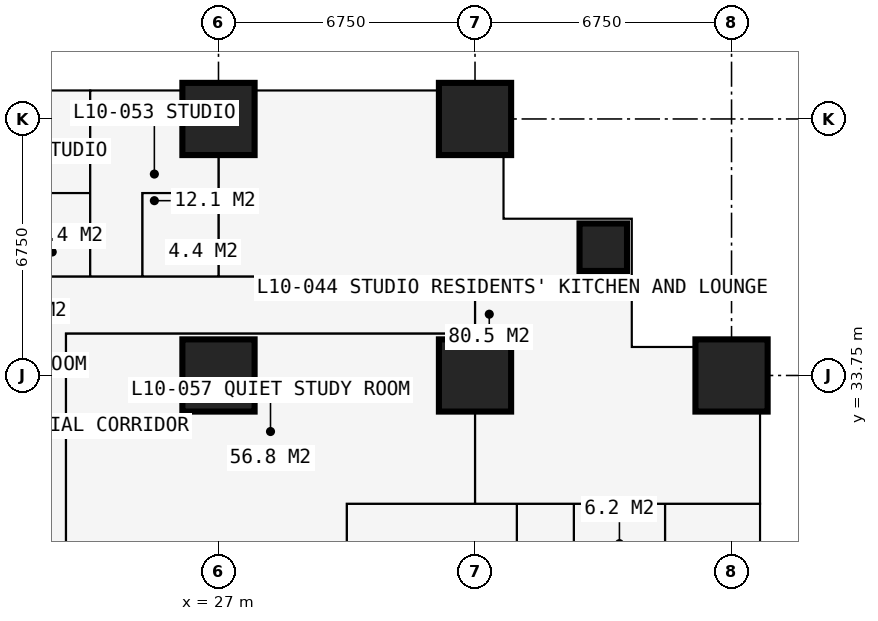
"""IFC4 building model, lengths in metres.
Left out: names, types, materials, properties, quantities, classifications, styles, units other than length and angle.
Written with IfcOpenShell. Run it as: python <this file> out.ifc"""

import sys

from ifc_helpers import new_model, si_unit, direction, frame, frame_2d, origin, origin_2d, place, context, subcontext, project, spatial, rectangle, extrude, element, fill, save


model = new_model("IFC4")
c1 = context("Model", 3, precision=1e-05, world=origin(), true_north=direction((0.0, 1.0)))
c2 = subcontext(c1, "Body", "Model", "MODEL_VIEW")
j1 = project(units=[si_unit("LENGTHUNIT", "METRE"), si_unit("PLANEANGLEUNIT", "RADIAN")], contexts=[c1])
p1 = place(None, origin())
s1 = spatial("IfcSite", under=j1, at=p1, CompositionType="ELEMENT")
p2 = place(p1, origin())
s2 = spatial("IfcBuilding", under=s1, at=p2, CompositionType="ELEMENT")
p3 = place(p2, frame((0.0, 0.0, 39.6)))
s3 = spatial("IfcBuildingStorey", under=s2, at=p3, CompositionType="ELEMENT", Elevation=39.6)
for number, where, z_axis, x_axis in (
    (1, (27.0, 33.75, 0.0), (0.0, 0.0, 1.0), (1.0, 0.0, 0.0)),
    (2, (27.0, 40.5, 0.0), (0.0, 0.0, 1.0), (1.0, 0.0, 0.0)),
    (3, (33.75, 33.75, 0.0), (0.0, 0.0, 1.0), (1.0, 0.0, 0.0)),
    (4, (33.75, 40.5, 0.0), (0.0, 0.0, 1.0), (1.0, 0.0, 0.0)),
):
    element("IfcColumn", number, at=place(p3, frame(where, z_axis=z_axis, x_axis=x_axis)), inside=s3, PredefinedType="COLUMN", context=c2, shape_type="SweptSolid", body=[
        extrude(rectangle(XDim=1.9, YDim=1.9, at=origin_2d()), origin(), (0.0, 0.0, 1.0), 3.6),
    ])
p4 = place(p3, frame((37.125, 37.125, 0.0), z_axis=(0.0, 0.0, 1.0), x_axis=(1.0, 0.0, 0.0)))
e5 = element("IfcColumn", 5, at=p4, inside=s3, PredefinedType="COLUMN", context=c2, shape_type="SweptSolid", body=[
    extrude(rectangle(XDim=1.25, YDim=1.25, at=origin_2d()), origin(), (0.0, 0.0, 1.0), 3.6),
])
p5 = place(p3, frame((40.5, 33.75, 0.0), z_axis=(0.0, 0.0, 1.0), x_axis=(1.0, 0.0, 0.0)))
e6 = element("IfcColumn", 6, at=p5, inside=s3, PredefinedType="COLUMN", context=c2, shape_type="SweptSolid", body=[
    extrude(rectangle(XDim=1.9, YDim=1.9, at=origin_2d()), origin(), (0.0, 0.0, 1.0), 3.6),
])
p6 = place(p3, frame((41.25, 34.5, 0.0), z_axis=(0.0, 0.0, 1.0), x_axis=(-1.0, 0.0, 0.0)))
e7 = element("IfcWall", 7, at=p6, inside=s3, PredefinedType="SOLIDWALL", context=c2, shape_type="SweptSolid", body=[
    extrude(rectangle(XDim=3.375, YDim=0.3, at=frame_2d((1.688, 0.0))), origin(), (0.0, 0.0, 1.0), 3.375),
])
p7 = place(p6, frame((1.857, 0.0, 0.9)))
e8 = element("IfcOpeningElement", 8, at=p7, cuts=e7, PredefinedType="OPENING", context=c2, shape_type="SweptSolid", body=[
    extrude(rectangle(XDim=1.2, YDim=1.8, at=frame_2d((0.6, 0.9))), frame((0.0, 0.16, 0.0), z_axis=(0.0, -1.0, 0.0), x_axis=(1.0, 0.0, 0.0)), (0.0, 0.0, 1.0), 0.32),
])
p8 = place(p3, frame((37.875, 34.5, 0.0), z_axis=(0.0, 0.0, 1.0), x_axis=(0.0, 1.0, 0.0)))
e9 = element("IfcWall", 9, at=p8, inside=s3, PredefinedType="SOLIDWALL", context=c2, shape_type="SweptSolid", body=[
    extrude(rectangle(XDim=3.375, YDim=0.3, at=frame_2d((1.688, 0.0))), origin(), (0.0, 0.0, 1.0), 3.375),
])
p9 = place(p8, frame((0.788, 0.0, 0.6)))
e10 = element("IfcOpeningElement", 10, at=p9, cuts=e9, PredefinedType="OPENING", context=c2, shape_type="SweptSolid", body=[
    extrude(rectangle(XDim=1.8, YDim=2.1, at=frame_2d((0.9, 1.05))), frame((0.0, 0.16, 0.0), z_axis=(0.0, -1.0, 0.0), x_axis=(1.0, 0.0, 0.0)), (0.0, 0.0, 1.0), 0.32),
])
p10 = place(p3, frame((37.875, 37.875, 0.0), z_axis=(0.0, 0.0, 1.0), x_axis=(-1.0, 0.0, 0.0)))
e11 = element("IfcWall", 11, at=p10, inside=s3, PredefinedType="SOLIDWALL", context=c2, shape_type="SweptSolid", body=[
    extrude(rectangle(XDim=3.375, YDim=0.3, at=frame_2d((1.688, 0.0))), origin(), (0.0, 0.0, 1.0), 3.375),
])
p11 = place(p10, frame((0.788, 0.0, 0.6)))
e12 = element("IfcOpeningElement", 12, at=p11, cuts=e11, PredefinedType="OPENING", context=c2, shape_type="SweptSolid", body=[
    extrude(rectangle(XDim=1.8, YDim=2.1, at=frame_2d((0.9, 1.05))), frame((0.0, 0.16, 0.0), z_axis=(0.0, -1.0, 0.0), x_axis=(1.0, 0.0, 0.0)), (0.0, 0.0, 1.0), 0.32),
])
p12 = place(p3, frame((34.5, 37.875, 0.0), z_axis=(0.0, 0.0, 1.0), x_axis=(0.0, 1.0, 0.0)))
e13 = element("IfcWall", 13, at=p12, inside=s3, PredefinedType="SOLIDWALL", context=c2, shape_type="SweptSolid", body=[
    extrude(rectangle(XDim=3.375, YDim=0.3, at=frame_2d((1.688, 0.0))), origin(), (0.0, 0.0, 1.0), 3.375),
])
p13 = place(p12, frame((0.317, 0.0, 0.9)))
e14 = element("IfcOpeningElement", 14, at=p13, cuts=e13, PredefinedType="OPENING", context=c2, shape_type="SweptSolid", body=[
    extrude(rectangle(XDim=1.2, YDim=1.8, at=frame_2d((0.6, 0.9))), frame((0.0, 0.16, 0.0), z_axis=(0.0, -1.0, 0.0), x_axis=(1.0, 0.0, 0.0)), (0.0, 0.0, 1.0), 0.32),
])
p14 = place(p3, frame((10.125, 36.35, 0.0), z_axis=(0.0, 0.0, 1.0), x_axis=(1.0, 0.0, 0.0)))
e15 = element("IfcWall", 15, at=p14, inside=s3, PredefinedType="PARTITIONING", context=c2, shape_type="SweptSolid", body=[
    extrude(rectangle(XDim=23.625, YDim=0.1, at=frame_2d((11.812, 0.0))), origin(), (0.0, 0.0, 1.0), 3.375),
])
p15 = place(p14, frame((0.2, 0.0, 0.0)))
e16 = element("IfcOpeningElement", 16, at=p15, cuts=e15, PredefinedType="OPENING", context=c2, shape_type="SweptSolid", body=[
    extrude(rectangle(XDim=0.95, YDim=2.2, at=frame_2d((0.475, 1.1))), frame((0.0, 0.06, 0.0), z_axis=(0.0, -1.0, 0.0), x_axis=(1.0, 0.0, 0.0)), (0.0, 0.0, 1.0), 0.12),
])
p16 = place(p14, frame((3.625, 0.0, 0.0)))
e17 = element("IfcOpeningElement", 17, at=p16, cuts=e15, PredefinedType="OPENING", context=c2, shape_type="SweptSolid", body=[
    extrude(rectangle(XDim=0.95, YDim=2.2, at=frame_2d((0.475, 1.1))), frame((0.0, 0.06, 0.0), z_axis=(0.0, -1.0, 0.0), x_axis=(1.0, 0.0, 0.0)), (0.0, 0.0, 1.0), 0.12),
])
p17 = place(p14, frame((7.0, 0.0, 0.0)))
e18 = element("IfcOpeningElement", 18, at=p17, cuts=e15, PredefinedType="OPENING", context=c2, shape_type="SweptSolid", body=[
    extrude(rectangle(XDim=0.95, YDim=2.2, at=frame_2d((0.475, 1.1))), frame((0.0, 0.06, 0.0), z_axis=(0.0, -1.0, 0.0), x_axis=(1.0, 0.0, 0.0)), (0.0, 0.0, 1.0), 0.12),
])
p18 = place(p14, frame((10.375, 0.0, 0.0)))
e19 = element("IfcOpeningElement", 19, at=p18, cuts=e15, PredefinedType="OPENING", context=c2, shape_type="SweptSolid", body=[
    extrude(rectangle(XDim=0.95, YDim=2.2, at=frame_2d((0.475, 1.1))), frame((0.0, 0.06, 0.0), z_axis=(0.0, -1.0, 0.0), x_axis=(1.0, 0.0, 0.0)), (0.0, 0.0, 1.0), 0.12),
])
p19 = place(p14, frame((13.75, 0.0, 0.0)))
e20 = element("IfcOpeningElement", 20, at=p19, cuts=e15, PredefinedType="OPENING", context=c2, shape_type="SweptSolid", body=[
    extrude(rectangle(XDim=0.95, YDim=2.2, at=frame_2d((0.475, 1.1))), frame((0.0, 0.06, 0.0), z_axis=(0.0, -1.0, 0.0), x_axis=(1.0, 0.0, 0.0)), (0.0, 0.0, 1.0), 0.12),
])
p20 = place(p3, frame((21.625, 38.55, 0.0), z_axis=(0.0, 0.0, 1.0), x_axis=(1.0, 0.0, 0.0)))
e21 = element("IfcWall", 21, at=p20, inside=s3, PredefinedType="PARTITIONING", context=c2, shape_type="SweptSolid", body=[
    extrude(rectangle(XDim=2.0, YDim=0.1, at=frame_2d((1.0, 0.0))), origin(), (0.0, 0.0, 1.0), 3.375),
])
p21 = place(p3, frame((22.988, 34.85, 0.0), z_axis=(0.0, 0.0, 1.0), x_axis=(1.0, 0.0, 0.0)))
e22 = element("IfcWall", 22, at=p21, inside=s3, PredefinedType="PARTITIONING", context=c2, shape_type="SweptSolid", body=[
    extrude(rectangle(XDim=10.762, YDim=0.15, at=frame_2d((5.381, 0.0))), origin(), (0.0, 0.0, 1.0), 3.375),
])
p22 = place(p21, frame((5.0, 0.0, 0.0)))
e23 = element("IfcOpeningElement", 23, at=p22, cuts=e22, PredefinedType="OPENING", context=c2, shape_type="SweptSolid", body=[
    extrude(rectangle(XDim=0.95, YDim=2.2, at=frame_2d((0.475, 1.1))), frame((0.0, 0.085, 0.0), z_axis=(0.0, -1.0, 0.0), x_axis=(1.0, 0.0, 0.0)), (0.0, 0.0, 1.0), 0.17),
])
p23 = place(p3, frame((22.988, 29.2, 0.0), z_axis=(0.0, 0.0, 1.0), x_axis=(0.0, 1.0, 0.0)))
e24 = element("IfcWall", 24, at=p23, inside=s3, PredefinedType="PARTITIONING", context=c2, shape_type="SweptSolid", body=[
    extrude(rectangle(XDim=5.65, YDim=0.15, at=frame_2d((2.825, 0.0))), origin(), (0.0, 0.0, 1.0), 3.375),
])
p24 = place(p3, frame((23.625, 36.35, 0.0), z_axis=(0.0, 0.0, 1.0), x_axis=(0.0, 1.0, 0.0)))
e25 = element("IfcWall", 25, at=p24, inside=s3, PredefinedType="PARTITIONING", context=c2, shape_type="SweptSolid", body=[
    extrude(rectangle(XDim=4.884, YDim=0.175, at=frame_2d((2.442, 0.0))), origin(), (0.0, 0.0, 1.0), 3.375),
])
p25 = place(p3, frame((25.0, 36.35, 0.0), z_axis=(0.0, 0.0, 1.0), x_axis=(0.0, 1.0, 0.0)))
e26 = element("IfcWall", 26, at=p25, inside=s3, PredefinedType="PARTITIONING", context=c2, shape_type="SweptSolid", body=[
    extrude(rectangle(XDim=2.2, YDim=0.1, at=frame_2d((1.1, 0.0))), origin(), (0.0, 0.0, 1.0), 3.375),
])
p26 = place(p25, frame((0.65, 0.0, 0.0)))
e27 = element("IfcOpeningElement", 27, at=p26, cuts=e26, PredefinedType="OPENING", context=c2, shape_type="SweptSolid", body=[
    extrude(rectangle(XDim=0.9, YDim=2.2, at=frame_2d((0.45, 1.1))), frame((0.0, 0.06, 0.0), z_axis=(0.0, -1.0, 0.0), x_axis=(1.0, 0.0, 0.0)), (0.0, 0.0, 1.0), 0.12),
])
p27 = place(p3, frame((25.0, 38.55, 0.0), z_axis=(0.0, 0.0, 1.0), x_axis=(1.0, 0.0, 0.0)))
e28 = element("IfcWall", 28, at=p27, inside=s3, PredefinedType="PARTITIONING", context=c2, shape_type="SweptSolid", body=[
    extrude(rectangle(XDim=2.0, YDim=0.1, at=frame_2d((1.0, 0.0))), origin(), (0.0, 0.0, 1.0), 3.375),
])
p28 = place(p3, frame((27.0, 36.35, 0.0), z_axis=(0.0, 0.0, 1.0), x_axis=(0.0, 1.0, 0.0)))
e29 = element("IfcWall", 29, at=p28, inside=s3, PredefinedType="PARTITIONING", context=c2, shape_type="SweptSolid", body=[
    extrude(rectangle(XDim=4.884, YDim=0.15, at=frame_2d((2.442, 0.0))), origin(), (0.0, 0.0, 1.0), 2.61),
])
p29 = place(p3, frame((30.375, 29.2, 0.0), z_axis=(0.0, 0.0, 1.0), x_axis=(0.0, 1.0, 0.0)))
e30 = element("IfcWall", 30, at=p29, inside=s3, PredefinedType="PARTITIONING", context=c2, shape_type="SweptSolid", body=[
    extrude(rectangle(XDim=1.175, YDim=0.15, at=frame_2d((0.587, 0.0))), origin(), (0.0, 0.0, 1.0), 3.375),
])
p30 = place(p3, frame((30.375, 30.375, 0.0), z_axis=(0.0, 0.0, 1.0), x_axis=(1.0, 0.0, 0.0)))
e31 = element("IfcWall", 31, at=p30, inside=s3, PredefinedType="PARTITIONING", context=c2, shape_type="SweptSolid", body=[
    extrude(rectangle(XDim=10.859, YDim=0.15, at=frame_2d((5.429, 0.0))), origin(), (0.0, 0.0, 1.0), 3.375),
])
p31 = place(p30, frame((4.725, 0.0, 0.0)))
e32 = element("IfcOpeningElement", 32, at=p31, cuts=e31, PredefinedType="OPENING", context=c2, shape_type="SweptSolid", body=[
    extrude(rectangle(XDim=1.0, YDim=2.2, at=frame_2d((0.5, 1.1))), frame((0.0, 0.085, 0.0), z_axis=(0.0, -1.0, 0.0), x_axis=(1.0, 0.0, 0.0)), (0.0, 0.0, 1.0), 0.17),
])
p32 = place(p3, frame((33.75, 30.375, 0.0), z_axis=(0.0, 0.0, 1.0), x_axis=(0.0, 1.0, 0.0)))
e33 = element("IfcWall", 33, at=p32, inside=s3, PredefinedType="PARTITIONING", context=c2, shape_type="SweptSolid", body=[
    extrude(rectangle(XDim=5.975, YDim=0.15, at=frame_2d((2.988, 0.0))), origin(), (0.0, 0.0, 1.0), 2.877),
])
p33 = place(p3, frame((34.85, 12.55, 0.0), z_axis=(0.0, 0.0, 1.0), x_axis=(0.0, 1.0, 0.0)))
e34 = element("IfcWall", 34, at=p33, inside=s3, PredefinedType="PARTITIONING", context=c2, shape_type="SweptSolid", body=[
    extrude(rectangle(XDim=17.825, YDim=0.15, at=frame_2d((8.913, 0.0))), origin(), (0.0, 0.0, 1.0), 3.375),
])
p34 = place(p33, frame((8.65, 0.0, 0.0)))
e35 = element("IfcOpeningElement", 35, at=p34, cuts=e34, PredefinedType="OPENING", context=c2, shape_type="SweptSolid", body=[
    extrude(rectangle(XDim=0.95, YDim=2.2, at=frame_2d((0.475, 1.1))), frame((0.0, 0.085, 0.0), z_axis=(0.0, -1.0, 0.0), x_axis=(1.0, 0.0, 0.0)), (0.0, 0.0, 1.0), 0.17),
])
p35 = place(p3, frame((36.35, 6.75, 0.0), z_axis=(0.0, 0.0, 1.0), x_axis=(0.0, 1.0, 0.0)))
e36 = element("IfcWall", 36, at=p35, inside=s3, PredefinedType="PARTITIONING", context=c2, shape_type="SweptSolid", body=[
    extrude(rectangle(XDim=23.625, YDim=0.15, at=frame_2d((11.812, 0.0))), origin(), (0.0, 0.0, 1.0), 3.375),
])
p36 = place(p35, frame((18.475, 0.0, 0.0)))
e37 = element("IfcOpeningElement", 37, at=p36, cuts=e36, PredefinedType="OPENING", context=c2, shape_type="SweptSolid", body=[
    extrude(rectangle(XDim=0.95, YDim=2.2, at=frame_2d((0.475, 1.1))), frame((0.0, 0.085, 0.0), z_axis=(0.0, -1.0, 0.0), x_axis=(1.0, 0.0, 0.0)), (0.0, 0.0, 1.0), 0.17),
])
p37 = place(p35, frame((11.725, 0.0, 0.0)))
e38 = element("IfcOpeningElement", 38, at=p37, cuts=e36, PredefinedType="OPENING", context=c2, shape_type="SweptSolid", body=[
    extrude(rectangle(XDim=0.95, YDim=2.2, at=frame_2d((0.475, 1.1))), frame((0.0, 0.085, 0.0), z_axis=(0.0, -1.0, 0.0), x_axis=(1.0, 0.0, 0.0)), (0.0, 0.0, 1.0), 0.17),
])
p38 = place(p35, frame((6.95, 0.0, 0.0)))
e39 = element("IfcOpeningElement", 39, at=p38, cuts=e36, PredefinedType="OPENING", context=c2, shape_type="SweptSolid", body=[
    extrude(rectangle(XDim=0.95, YDim=2.2, at=frame_2d((0.475, 1.1))), frame((0.0, 0.085, 0.0), z_axis=(0.0, -1.0, 0.0), x_axis=(1.0, 0.0, 0.0)), (0.0, 0.0, 1.0), 0.17),
])
p39 = place(p3, frame((38.75, 27.775, 0.0), z_axis=(0.0, 0.0, 1.0), x_axis=(0.0, 1.0, 0.0)))
e40 = element("IfcWall", 40, at=p39, inside=s3, PredefinedType="PARTITIONING", context=c2, shape_type="SweptSolid", body=[
    extrude(rectangle(XDim=2.6, YDim=0.1, at=frame_2d((1.3, 0.0))), origin(), (0.0, 0.0, 1.0), 3.375),
])
p40 = place(p39, frame((0.85, 0.0, 0.0)))
e41 = element("IfcOpeningElement", 41, at=p40, cuts=e40, PredefinedType="OPENING", context=c2, shape_type="SweptSolid", body=[
    extrude(rectangle(XDim=0.9, YDim=2.2, at=frame_2d((0.45, 1.1))), frame((0.0, 0.06, 0.0), z_axis=(0.0, -1.0, 0.0), x_axis=(1.0, 0.0, 0.0)), (0.0, 0.0, 1.0), 0.12),
])
p41 = place(p7, origin())
e42 = element("IfcWindow", 42, at=p41, inside=s3, PartitioningType="SINGLE_PANEL", PredefinedType="WINDOW", context=c2, shape_type="SweptSolid", body=[
    extrude(rectangle(XDim=1.2, YDim=1.8, at=frame_2d((0.6, 0.9))), frame((0.0, 0.03, 0.0), z_axis=(0.0, -1.0, 0.0), x_axis=(1.0, 0.0, 0.0)), (0.0, 0.0, 1.0), 0.06),
])
fill(e8, e42)
p42 = place(p9, origin())
e43 = element("IfcWindow", 43, at=p42, inside=s3, PartitioningType="SINGLE_PANEL", PredefinedType="WINDOW", context=c2, shape_type="SweptSolid", body=[
    extrude(rectangle(XDim=1.8, YDim=2.1, at=frame_2d((0.9, 1.05))), frame((0.0, 0.03, 0.0), z_axis=(0.0, -1.0, 0.0), x_axis=(1.0, 0.0, 0.0)), (0.0, 0.0, 1.0), 0.06),
])
fill(e10, e43)
p43 = place(p11, origin())
e44 = element("IfcWindow", 44, at=p43, inside=s3, PartitioningType="SINGLE_PANEL", PredefinedType="WINDOW", context=c2, shape_type="SweptSolid", body=[
    extrude(rectangle(XDim=1.8, YDim=2.1, at=frame_2d((0.9, 1.05))), frame((0.0, 0.03, 0.0), z_axis=(0.0, -1.0, 0.0), x_axis=(1.0, 0.0, 0.0)), (0.0, 0.0, 1.0), 0.06),
])
fill(e12, e44)
p44 = place(p13, origin())
e45 = element("IfcWindow", 45, at=p44, inside=s3, PartitioningType="SINGLE_PANEL", PredefinedType="WINDOW", context=c2, shape_type="SweptSolid", body=[
    extrude(rectangle(XDim=1.2, YDim=1.8, at=frame_2d((0.6, 0.9))), frame((0.0, 0.03, 0.0), z_axis=(0.0, -1.0, 0.0), x_axis=(1.0, 0.0, 0.0)), (0.0, 0.0, 1.0), 0.06),
])
fill(e14, e45)
p45 = place(p40, origin())
e46 = element("IfcDoor", 46, at=p45, inside=s3, OperationType="SINGLE_SWING_RIGHT", PredefinedType="DOOR", context=c2, shape_type="SweptSolid", body=[
    extrude(rectangle(XDim=0.9, YDim=2.2, at=frame_2d((0.45, 1.1))), frame((0.0, 0.025, 0.0), z_axis=(0.0, -1.0, 0.0), x_axis=(1.0, 0.0, 0.0)), (0.0, 0.0, 1.0), 0.05),
])
fill(e41, e46)
p46 = place(p31, origin())
e47 = element("IfcDoor", 47, at=p46, inside=s3, OperationType="SINGLE_SWING_LEFT", PredefinedType="DOOR", context=c2, shape_type="SweptSolid", body=[
    extrude(rectangle(XDim=1.0, YDim=2.2, at=frame_2d((0.5, 1.1))), frame((0.0, 0.025, 0.0), z_axis=(0.0, -1.0, 0.0), x_axis=(1.0, 0.0, 0.0)), (0.0, 0.0, 1.0), 0.05),
])
fill(e32, e47)
p47 = place(p19, origin())
e48 = element("IfcDoor", 48, at=p47, inside=s3, OperationType="SINGLE_SWING_LEFT", PredefinedType="DOOR", context=c2, shape_type="SweptSolid", body=[
    extrude(rectangle(XDim=0.95, YDim=2.2, at=frame_2d((0.475, 1.1))), frame((0.0, 0.025, 0.0), z_axis=(0.0, -1.0, 0.0), x_axis=(1.0, 0.0, 0.0)), (0.0, 0.0, 1.0), 0.05),
])
fill(e20, e48)
p48 = place(p26, origin())
e49 = element("IfcDoor", 49, at=p48, inside=s3, OperationType="SINGLE_SWING_RIGHT", PredefinedType="DOOR", context=c2, shape_type="SweptSolid", body=[
    extrude(rectangle(XDim=0.9, YDim=2.2, at=frame_2d((0.45, 1.1))), frame((0.0, 0.025, 0.0), z_axis=(0.0, -1.0, 0.0), x_axis=(1.0, 0.0, 0.0)), (0.0, 0.0, 1.0), 0.05),
])
fill(e27, e49)
p49 = place(p22, origin())
e50 = element("IfcDoor", 50, at=p49, inside=s3, OperationType="SINGLE_SWING_LEFT", PredefinedType="DOOR", context=c2, shape_type="SweptSolid", body=[
    extrude(rectangle(XDim=0.95, YDim=2.2, at=frame_2d((0.475, 1.1))), frame((0.0, 0.025, 0.0), z_axis=(0.0, -1.0, 0.0), x_axis=(1.0, 0.0, 0.0)), (0.0, 0.0, 1.0), 0.05),
])
fill(e23, e50)
save(model, sys.argv[1])
